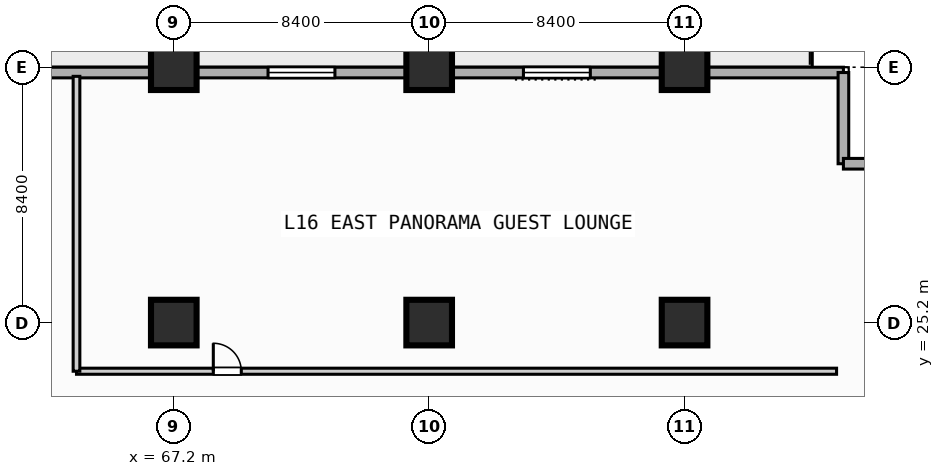
"""IFC4 building model, lengths in metres.
Left out: names, types, materials, properties, quantities, classifications, styles, units other than length and angle.
Written with IfcOpenShell. Run it as: python <this file> out.ifc"""

import sys

from ifc_helpers import new_model, si_unit, direction, frame, frame_2d, origin, origin_2d, place, context, subcontext, project, spatial, rectangle, extrude, element, fill, save


model = new_model("IFC4")
c1 = context("Model", 3, precision=1e-05, world=origin(), true_north=direction((0.0, 1.0)))
c2 = subcontext(c1, "Body", "Model", "MODEL_VIEW")
j1 = project(units=[si_unit("LENGTHUNIT", "METRE"), si_unit("PLANEANGLEUNIT", "RADIAN")], contexts=[c1])
p1 = place(None, origin())
s1 = spatial("IfcSite", under=j1, at=p1, CompositionType="ELEMENT")
p2 = place(p1, origin())
s2 = spatial("IfcBuilding", under=s1, at=p2, CompositionType="ELEMENT")
p3 = place(p2, frame((0.0, 0.0, 70.0)))
s3 = spatial("IfcBuildingStorey", under=s2, at=p3, CompositionType="ELEMENT", Elevation=70.0)
for number, where, z_axis, x_axis in (
    (1, (67.2, 25.2, 0.0), (0.0, 0.0, 1.0), (1.0, 0.0, 0.0)),
    (2, (67.2, 33.6, 0.0), (0.0, 0.0, 1.0), (1.0, 0.0, 0.0)),
    (3, (75.6, 25.2, 0.0), (0.0, 0.0, 1.0), (1.0, 0.0, 0.0)),
    (4, (75.6, 33.6, 0.0), (0.0, 0.0, 1.0), (1.0, 0.0, 0.0)),
    (5, (84.0, 25.2, 0.0), (0.0, 0.0, 1.0), (1.0, 0.0, 0.0)),
    (6, (84.0, 33.6, 0.0), (0.0, 0.0, 1.0), (1.0, 0.0, 0.0)),
):
    element("IfcColumn", number, at=place(p3, frame(where, z_axis=z_axis, x_axis=x_axis)), inside=s3, PredefinedType="COLUMN", context=c2, shape_type="SweptSolid", body=[
        extrude(rectangle(XDim=1.5, YDim=1.5, at=origin_2d()), origin(), (0.0, 0.0, 1.0), 3.8),
    ])
p4 = place(p3, frame((33.425, 33.425, 0.0), z_axis=(0.0, 0.0, 1.0), x_axis=(1.0, 0.0, 0.0)))
e7 = element("IfcWall", 7, at=p4, inside=s3, PredefinedType="STANDARD", context=c2, shape_type="SweptSolid", body=[
    extrude(rectangle(XDim=55.8, YDim=0.35, at=frame_2d((27.9, 0.0))), origin(), (0.0, 0.0, 1.0), 3.55),
])
p5 = place(p4, frame((12.075, 0.0, 0.0)))
e8 = element("IfcOpeningElement", 8, at=p5, cuts=e7, PredefinedType="OPENING", context=c2, shape_type="SweptSolid", body=[
    extrude(rectangle(XDim=1.4, YDim=2.2, at=frame_2d((0.7, 1.1))), frame((0.0, 0.185, 0.0), z_axis=(0.0, -1.0, 0.0), x_axis=(1.0, 0.0, 0.0)), (0.0, 0.0, 1.0), 0.37),
])
p6 = place(p4, frame((3.275, 0.0, 0.85)))
e9 = element("IfcOpeningElement", 9, at=p6, cuts=e7, PredefinedType="OPENING", context=c2, shape_type="SweptSolid", body=[
    extrude(rectangle(XDim=2.2, YDim=1.8, at=frame_2d((1.1, 0.9))), frame((0.0, 0.185, 0.0), z_axis=(0.0, -1.0, 0.0), x_axis=(1.0, 0.0, 0.0)), (0.0, 0.0, 1.0), 0.37),
])
p7 = place(p4, frame((36.875, 0.0, 0.85)))
e10 = element("IfcOpeningElement", 10, at=p7, cuts=e7, PredefinedType="OPENING", context=c2, shape_type="SweptSolid", body=[
    extrude(rectangle(XDim=2.2, YDim=1.8, at=frame_2d((1.1, 0.9))), frame((0.0, 0.185, 0.0), z_axis=(0.0, -1.0, 0.0), x_axis=(1.0, 0.0, 0.0)), (0.0, 0.0, 1.0), 0.37),
])
p8 = place(p4, frame((45.275, 0.0, 0.85)))
e11 = element("IfcOpeningElement", 11, at=p8, cuts=e7, PredefinedType="OPENING", context=c2, shape_type="SweptSolid", body=[
    extrude(rectangle(XDim=2.2, YDim=1.8, at=frame_2d((1.1, 0.9))), frame((0.0, 0.185, 0.0), z_axis=(0.0, -1.0, 0.0), x_axis=(1.0, 0.0, 0.0)), (0.0, 0.0, 1.0), 0.37),
])
for number, where, z_axis, x_axis in (
    (12, (89.225, 33.425, 0.0), (0.0, 0.0, 1.0), (0.0, -1.0, 0.0)),
    (13, (89.225, 30.425, 0.0), (0.0, 0.0, 1.0), (1.0, 0.0, 0.0)),
):
    element("IfcWall", number, at=place(p3, frame(where, z_axis=z_axis, x_axis=x_axis)), inside=s3, PredefinedType="STANDARD", context=c2, shape_type="SweptSolid", body=[
        extrude(rectangle(XDim=3.0, YDim=0.35, at=frame_2d((1.5, 0.0))), origin(), (0.0, 0.0, 1.0), 3.55),
    ])
p9 = place(p3, frame((64.0, 23.6, 0.0), z_axis=(0.0, 0.0, 1.0), x_axis=(1.0, 0.0, 0.0)))
e14 = element("IfcWall", 14, at=p9, inside=s3, PredefinedType="PARTITIONING", context=c2, shape_type="SweptSolid", body=[
    extrude(rectangle(XDim=25.0, YDim=0.2, at=frame_2d((12.5, 0.0))), origin(), (0.0, 0.0, 1.0), 3.55),
])
p10 = place(p9, frame((4.5, 0.0, 0.0)))
e15 = element("IfcOpeningElement", 15, at=p10, cuts=e14, PredefinedType="OPENING", context=c2, shape_type="SweptSolid", body=[
    extrude(rectangle(XDim=0.92, YDim=2.1, at=frame_2d((0.46, 1.05))), frame((0.0, 0.11, 0.0), z_axis=(0.0, -1.0, 0.0), x_axis=(1.0, 0.0, 0.0)), (0.0, 0.0, 1.0), 0.22),
])
p11 = place(p3, frame((64.0, 23.6, 0.0), z_axis=(0.0, 0.0, 1.0), x_axis=(0.0, 1.0, 0.0)))
e16 = element("IfcWall", 16, at=p11, inside=s3, PredefinedType="PARTITIONING", context=c2, shape_type="SweptSolid", body=[
    extrude(rectangle(XDim=9.7, YDim=0.22, at=frame_2d((4.85, 0.0))), origin(), (0.0, 0.0, 1.0), 3.55),
])
p12 = place(p7, origin())
e17 = element("IfcWindow", 17, at=p12, inside=s3, PartitioningType="SINGLE_PANEL", PredefinedType="WINDOW", context=c2, shape_type="SweptSolid", body=[
    extrude(rectangle(XDim=2.2, YDim=1.8, at=frame_2d((1.1, 0.9))), frame((0.0, 0.03, 0.0), z_axis=(0.0, -1.0, 0.0), x_axis=(1.0, 0.0, 0.0)), (0.0, 0.0, 1.0), 0.06),
])
fill(e10, e17)
p13 = place(p8, origin())
e18 = element("IfcWindow", 18, at=p13, inside=s3, PartitioningType="SINGLE_PANEL", PredefinedType="WINDOW", context=c2, shape_type="SweptSolid", body=[
    extrude(rectangle(XDim=2.2, YDim=1.8, at=frame_2d((1.1, 0.9))), frame((0.0, 0.03, 0.0), z_axis=(0.0, -1.0, 0.0), x_axis=(1.0, 0.0, 0.0)), (0.0, 0.0, 1.0), 0.06),
])
fill(e11, e18)
p14 = place(p10, origin())
e19 = element("IfcDoor", 19, at=p14, inside=s3, OperationType="SINGLE_SWING_LEFT", PredefinedType="DOOR", context=c2, shape_type="SweptSolid", body=[
    extrude(rectangle(XDim=0.92, YDim=2.1, at=frame_2d((0.46, 1.05))), frame((0.0, 0.025, 0.0), z_axis=(0.0, -1.0, 0.0), x_axis=(1.0, 0.0, 0.0)), (0.0, 0.0, 1.0), 0.05),
])
fill(e15, e19)
save(model, sys.argv[1])
